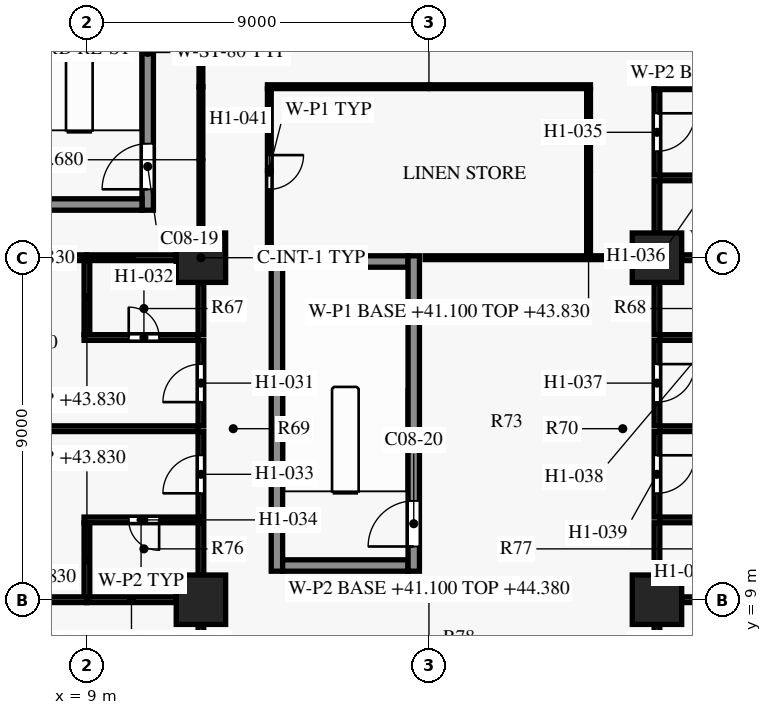
"""IFC4 building model, lengths in metres.
Left out: names, types, materials, properties, quantities, classifications, styles, units other than length and angle.
Written with IfcOpenShell. Run it as: python <this file> out.ifc"""

import sys

from ifc_helpers import new_model, si_unit, direction, frame, frame_2d, origin, origin_2d, place, context, subcontext, project, spatial, rectangle, extrude, element, fill, save


model = new_model("IFC4")
c1 = context("Model", 3, precision=1e-05, world=origin(), true_north=direction((0.0, 1.0)))
c2 = subcontext(c1, "Body", "Model", "MODEL_VIEW")
j1 = project(units=[si_unit("LENGTHUNIT", "METRE"), si_unit("PLANEANGLEUNIT", "RADIAN")], contexts=[c1])
p1 = place(None, origin())
s1 = spatial("IfcSite", under=j1, at=p1, CompositionType="ELEMENT")
p2 = place(p1, origin())
s2 = spatial("IfcBuilding", under=s1, at=p2, CompositionType="ELEMENT")
p3 = place(p2, frame((0.0, 0.0, 41.1)))
s3 = spatial("IfcBuildingStorey", under=s2, at=p3, CompositionType="ELEMENT", Elevation=41.1)
for number, where, z_axis, x_axis in (
    (1, (12.0, 9.0, 0.0), (0.0, 0.0, 1.0), (1.0, 0.0, 0.0)),
    (2, (12.0, 18.0, 0.0), (0.0, 0.0, 1.0), (1.0, 0.0, 0.0)),
    (3, (24.0, 9.0, 0.0), (0.0, 0.0, 1.0), (1.0, 0.0, 0.0)),
    (4, (24.0, 18.0, 0.0), (0.0, 0.0, 1.0), (1.0, 0.0, 0.0)),
):
    element("IfcColumn", number, at=place(p3, frame(where, z_axis=z_axis, x_axis=x_axis)), inside=s3, PredefinedType="COLUMN", context=c2, shape_type="SweptSolid", body=[
        extrude(rectangle(XDim=1.3, YDim=1.3, at=origin_2d()), origin(), (0.0, 0.0, 1.0), 3.6),
    ])
for number, where, z_axis, x_axis in (
    (5, (14.15, 9.9, 0.0), (0.0, 0.0, 1.0), (1.0, 0.0, 0.0)),
    (6, (14.15, 17.9, 0.0), (0.0, 0.0, 1.0), (1.0, 0.0, 0.0)),
    (7, (7.15, 19.4, 0.0), (0.0, 0.0, 1.0), (1.0, 0.0, 0.0)),
):
    element("IfcWall", number, at=place(p3, frame(where, z_axis=z_axis, x_axis=x_axis)), inside=s3, PredefinedType="SHEAR", context=c2, shape_type="SweptSolid", body=[
        extrude(rectangle(XDim=3.3, YDim=0.3, at=frame_2d((1.65, 0.0))), origin(), (0.0, 0.0, 1.0), 3.3),
    ])
p4 = place(p3, frame((10.6, 19.25, 0.0), z_axis=(0.0, 0.0, 1.0), x_axis=(0.0, 1.0, 0.0)))
e8 = element("IfcWall", 8, at=p4, inside=s3, PredefinedType="SHEAR", context=c2, shape_type="SweptSolid", body=[
    extrude(rectangle(XDim=8.3, YDim=0.3, at=frame_2d((4.15, 0.0))), origin(), (0.0, 0.0, 1.0), 3.3),
])
p5 = place(p4, frame((0.55, 0.0, 0.0)))
e9 = element("IfcOpeningElement", 9, at=p5, cuts=e8, PredefinedType="OPENING", context=c2, shape_type="SweptSolid", body=[
    extrude(rectangle(XDim=1.2, YDim=2.2, at=frame_2d((0.6, 1.1))), frame((0.0, 0.16, 0.0), z_axis=(0.0, -1.0, 0.0), x_axis=(1.0, 0.0, 0.0)), (0.0, 0.0, 1.0), 0.32),
])
p6 = place(p3, frame((14.0, 9.75, 0.0), z_axis=(0.0, 0.0, 1.0), x_axis=(0.0, 1.0, 0.0)))
e10 = element("IfcWall", 10, at=p6, inside=s3, PredefinedType="SHEAR", context=c2, shape_type="SweptSolid", body=[
    extrude(rectangle(XDim=8.3, YDim=0.3, at=frame_2d((4.15, 0.0))), origin(), (0.0, 0.0, 1.0), 3.3),
])
p7 = place(p3, frame((17.6, 9.75, 0.0), z_axis=(0.0, 0.0, 1.0), x_axis=(0.0, 1.0, 0.0)))
e11 = element("IfcWall", 11, at=p7, inside=s3, PredefinedType="SHEAR", context=c2, shape_type="SweptSolid", body=[
    extrude(rectangle(XDim=8.3, YDim=0.3, at=frame_2d((4.15, 0.0))), origin(), (0.0, 0.0, 1.0), 3.3),
])
p8 = place(p7, frame((0.65, 0.0, 0.0)))
e12 = element("IfcOpeningElement", 12, at=p8, cuts=e11, PredefinedType="OPENING", context=c2, shape_type="SweptSolid", body=[
    extrude(rectangle(XDim=1.2, YDim=2.2, at=frame_2d((0.6, 1.1))), frame((0.0, 0.16, 0.0), z_axis=(0.0, -1.0, 0.0), x_axis=(1.0, 0.0, 0.0)), (0.0, 0.0, 1.0), 0.32),
])
for number, where, z_axis, x_axis in (
    (13, (12.0, 7.275, 0.0), (0.0, 0.0, 1.0), (0.0, 1.0, 0.0)),
    (14, (24.0, 8.345, 0.0), (0.0, 0.0, 1.0), (0.0, -1.0, 0.0)),
):
    element("IfcWall", number, at=place(p3, frame(where, z_axis=z_axis, x_axis=x_axis)), inside=s3, PredefinedType="PARTITIONING", context=c2, shape_type="SweptSolid", body=[
        extrude(rectangle(XDim=1.07, YDim=0.15, at=frame_2d((0.535, 0.0))), origin(), (0.0, 0.0, 1.0), 2.58),
    ])
p9 = place(p3, frame((9.0, 9.0, 0.0), z_axis=(0.0, 0.0, 1.0), x_axis=(-1.0, 0.0, 0.0)))
e15 = element("IfcWall", 15, at=p9, inside=s3, PredefinedType="PARTITIONING", context=c2, shape_type="SweptSolid", body=[
    extrude(rectangle(XDim=7.975, YDim=0.15, at=frame_2d((3.988, 0.0))), origin(), (0.0, 0.0, 1.0), 2.73),
])
for number, where, z_axis, x_axis in (
    (16, (11.345, 9.0, 0.0), (0.0, 0.0, 1.0), (-1.0, 0.0, 0.0)),
    (17, (27.0, 9.0, 0.0), (0.0, 0.0, 1.0), (-1.0, 0.0, 0.0)),
):
    element("IfcWall", number, at=place(p3, frame(where, z_axis=z_axis, x_axis=x_axis)), inside=s3, PredefinedType="PARTITIONING", context=c2, shape_type="SweptSolid", body=[
        extrude(rectangle(XDim=2.345, YDim=0.15, at=frame_2d((1.172, 0.0))), origin(), (0.0, 0.0, 1.0), 2.73),
    ])
p10 = place(p3, frame((12.0, 9.655, 0.0), z_axis=(0.0, 0.0, 1.0), x_axis=(0.0, 1.0, 0.0)))
e18 = element("IfcWall", 18, at=p10, inside=s3, PredefinedType="PARTITIONING", context=c2, shape_type="SweptSolid", body=[
    extrude(rectangle(XDim=1.37, YDim=0.15, at=frame_2d((0.685, 0.0))), origin(), (0.0, 0.0, 1.0), 2.58),
])
p11 = place(p3, frame((9.0, 11.025, 0.0), z_axis=(0.0, 0.0, 1.0), x_axis=(0.0, -1.0, 0.0)))
e19 = element("IfcWall", 19, at=p11, inside=s3, PredefinedType="PARTITIONING", context=c2, shape_type="SweptSolid", body=[
    extrude(rectangle(XDim=1.95, YDim=0.15, at=frame_2d((0.975, 0.0))), origin(), (0.0, 0.0, 1.0), 2.73),
])
p12 = place(p3, frame((24.0, 11.025, 0.0), z_axis=(0.0, 0.0, 1.0), x_axis=(0.0, -1.0, 0.0)))
e20 = element("IfcWall", 20, at=p12, inside=s3, PredefinedType="PARTITIONING", context=c2, shape_type="SweptSolid", body=[
    extrude(rectangle(XDim=1.37, YDim=0.15, at=frame_2d((0.685, 0.0))), origin(), (0.0, 0.0, 1.0), 2.58),
])
p13 = place(p3, frame((11.925, 11.1, 0.0), z_axis=(0.0, 0.0, 1.0), x_axis=(-1.0, 0.0, 0.0)))
e21 = element("IfcWall", 21, at=p13, inside=s3, PredefinedType="PARTITIONING", context=c2, shape_type="SweptSolid", body=[
    extrude(rectangle(XDim=3.0, YDim=0.15, at=frame_2d((1.5, 0.0))), origin(), (0.0, 0.0, 1.0), 2.58),
])
p14 = place(p13, frame((1.025, 0.0, 0.0)))
e22 = element("IfcOpeningElement", 22, at=p14, cuts=e21, PredefinedType="OPENING", context=c2, shape_type="SweptSolid", body=[
    extrude(rectangle(XDim=0.8, YDim=2.1, at=frame_2d((0.4, 1.05))), frame((0.0, 0.085, 0.0), z_axis=(0.0, -1.0, 0.0), x_axis=(1.0, 0.0, 0.0)), (0.0, 0.0, 1.0), 0.17),
])
p15 = place(p3, frame((27.075, 11.1, 0.0), z_axis=(0.0, 0.0, 1.0), x_axis=(-1.0, 0.0, 0.0)))
e23 = element("IfcWall", 23, at=p15, inside=s3, PredefinedType="PARTITIONING", context=c2, shape_type="SweptSolid", body=[
    extrude(rectangle(XDim=3.0, YDim=0.15, at=frame_2d((1.5, 0.0))), origin(), (0.0, 0.0, 1.0), 2.58),
])
p16 = place(p15, frame((1.175, 0.0, 0.0)))
e24 = element("IfcOpeningElement", 24, at=p16, cuts=e23, PredefinedType="OPENING", context=c2, shape_type="SweptSolid", body=[
    extrude(rectangle(XDim=0.8, YDim=2.1, at=frame_2d((0.4, 1.05))), frame((0.0, 0.085, 0.0), z_axis=(0.0, -1.0, 0.0), x_axis=(1.0, 0.0, 0.0)), (0.0, 0.0, 1.0), 0.17),
])
p17 = place(p3, frame((12.0, 11.175, 0.0), z_axis=(0.0, 0.0, 1.0), x_axis=(0.0, 1.0, 0.0)))
e25 = element("IfcWall", 25, at=p17, inside=s3, PredefinedType="PARTITIONING", context=c2, shape_type="SweptSolid", body=[
    extrude(rectangle(XDim=2.25, YDim=0.15, at=frame_2d((1.125, 0.0))), origin(), (0.0, 0.0, 1.0), 2.58),
])
p18 = place(p17, frame((0.625, 0.0, 0.0)))
e26 = element("IfcOpeningElement", 26, at=p18, cuts=e25, PredefinedType="OPENING", context=c2, shape_type="SweptSolid", body=[
    extrude(rectangle(XDim=1.0, YDim=2.1, at=frame_2d((0.5, 1.05))), frame((0.0, 0.085, 0.0), z_axis=(0.0, -1.0, 0.0), x_axis=(1.0, 0.0, 0.0)), (0.0, 0.0, 1.0), 0.17),
])
p19 = place(p3, frame((24.0, 13.425, 0.0), z_axis=(0.0, 0.0, 1.0), x_axis=(0.0, -1.0, 0.0)))
e27 = element("IfcWall", 27, at=p19, inside=s3, PredefinedType="PARTITIONING", context=c2, shape_type="SweptSolid", body=[
    extrude(rectangle(XDim=2.25, YDim=0.15, at=frame_2d((1.125, 0.0))), origin(), (0.0, 0.0, 1.0), 2.58),
])
p20 = place(p19, frame((0.625, 0.0, 0.0)))
e28 = element("IfcOpeningElement", 28, at=p20, cuts=e27, PredefinedType="OPENING", context=c2, shape_type="SweptSolid", body=[
    extrude(rectangle(XDim=1.0, YDim=2.1, at=frame_2d((0.5, 1.05))), frame((0.0, 0.085, 0.0), z_axis=(0.0, -1.0, 0.0), x_axis=(1.0, 0.0, 0.0)), (0.0, 0.0, 1.0), 0.17),
])
for number, where, z_axis, x_axis in (
    (29, (11.925, 13.5, 0.0), (0.0, 0.0, 1.0), (-1.0, 0.0, 0.0)),
    (30, (35.425, 13.5, 0.0), (0.0, 0.0, 1.0), (-1.0, 0.0, 0.0)),
):
    element("IfcWall", number, at=place(p3, frame(where, z_axis=z_axis, x_axis=x_axis)), inside=s3, PredefinedType="PARTITIONING", context=c2, shape_type="SweptSolid", body=[
        extrude(rectangle(XDim=11.35, YDim=0.15, at=frame_2d((5.675, 0.0))), origin(), (0.0, 0.0, 1.0), 2.58),
    ])
p21 = place(p3, frame((12.0, 13.575, 0.0), z_axis=(0.0, 0.0, 1.0), x_axis=(0.0, 1.0, 0.0)))
e31 = element("IfcWall", 31, at=p21, inside=s3, PredefinedType="PARTITIONING", context=c2, shape_type="SweptSolid", body=[
    extrude(rectangle(XDim=2.25, YDim=0.15, at=frame_2d((1.125, 0.0))), origin(), (0.0, 0.0, 1.0), 2.58),
])
p22 = place(p21, frame((0.625, 0.0, 0.0)))
e32 = element("IfcOpeningElement", 32, at=p22, cuts=e31, PredefinedType="OPENING", context=c2, shape_type="SweptSolid", body=[
    extrude(rectangle(XDim=1.0, YDim=2.1, at=frame_2d((0.5, 1.05))), frame((0.0, 0.085, 0.0), z_axis=(0.0, -1.0, 0.0), x_axis=(1.0, 0.0, 0.0)), (0.0, 0.0, 1.0), 0.17),
])
p23 = place(p3, frame((24.0, 15.825, 0.0), z_axis=(0.0, 0.0, 1.0), x_axis=(0.0, -1.0, 0.0)))
e33 = element("IfcWall", 33, at=p23, inside=s3, PredefinedType="PARTITIONING", context=c2, shape_type="SweptSolid", body=[
    extrude(rectangle(XDim=2.25, YDim=0.15, at=frame_2d((1.125, 0.0))), origin(), (0.0, 0.0, 1.0), 2.58),
])
p24 = place(p23, frame((0.625, 0.0, 0.0)))
e34 = element("IfcOpeningElement", 34, at=p24, cuts=e33, PredefinedType="OPENING", context=c2, shape_type="SweptSolid", body=[
    extrude(rectangle(XDim=1.0, YDim=2.1, at=frame_2d((0.5, 1.05))), frame((0.0, 0.085, 0.0), z_axis=(0.0, -1.0, 0.0), x_axis=(1.0, 0.0, 0.0)), (0.0, 0.0, 1.0), 0.17),
])
p25 = place(p3, frame((8.925, 15.9, 0.0), z_axis=(0.0, 0.0, 1.0), x_axis=(1.0, 0.0, 0.0)))
e35 = element("IfcWall", 35, at=p25, inside=s3, PredefinedType="PARTITIONING", context=c2, shape_type="SweptSolid", body=[
    extrude(rectangle(XDim=3.0, YDim=0.15, at=frame_2d((1.5, 0.0))), origin(), (0.0, 0.0, 1.0), 2.58),
])
p26 = place(p25, frame((1.175, 0.0, 0.0)))
e36 = element("IfcOpeningElement", 36, at=p26, cuts=e35, PredefinedType="OPENING", context=c2, shape_type="SweptSolid", body=[
    extrude(rectangle(XDim=0.8, YDim=2.1, at=frame_2d((0.4, 1.05))), frame((0.0, 0.085, 0.0), z_axis=(0.0, -1.0, 0.0), x_axis=(1.0, 0.0, 0.0)), (0.0, 0.0, 1.0), 0.17),
])
p27 = place(p3, frame((24.075, 15.9, 0.0), z_axis=(0.0, 0.0, 1.0), x_axis=(1.0, 0.0, 0.0)))
e37 = element("IfcWall", 37, at=p27, inside=s3, PredefinedType="PARTITIONING", context=c2, shape_type="SweptSolid", body=[
    extrude(rectangle(XDim=3.0, YDim=0.15, at=frame_2d((1.5, 0.0))), origin(), (0.0, 0.0, 1.0), 2.58),
])
p28 = place(p27, frame((1.025, 0.0, 0.0)))
e38 = element("IfcOpeningElement", 38, at=p28, cuts=e37, PredefinedType="OPENING", context=c2, shape_type="SweptSolid", body=[
    extrude(rectangle(XDim=0.8, YDim=2.1, at=frame_2d((0.4, 1.05))), frame((0.0, 0.085, 0.0), z_axis=(0.0, -1.0, 0.0), x_axis=(1.0, 0.0, 0.0)), (0.0, 0.0, 1.0), 0.17),
])
for number, where, z_axis, x_axis in (
    (39, (12.0, 15.975, 0.0), (0.0, 0.0, 1.0), (0.0, 1.0, 0.0)),
    (40, (24.0, 17.345, 0.0), (0.0, 0.0, 1.0), (0.0, -1.0, 0.0)),
):
    element("IfcWall", number, at=place(p3, frame(where, z_axis=z_axis, x_axis=x_axis)), inside=s3, PredefinedType="PARTITIONING", context=c2, shape_type="SweptSolid", body=[
        extrude(rectangle(XDim=1.37, YDim=0.15, at=frame_2d((0.685, 0.0))), origin(), (0.0, 0.0, 1.0), 2.58),
    ])
p29 = place(p3, frame((9.0, 17.925, 0.0), z_axis=(0.0, 0.0, 1.0), x_axis=(0.0, -1.0, 0.0)))
e41 = element("IfcWall", 41, at=p29, inside=s3, PredefinedType="PARTITIONING", context=c2, shape_type="SweptSolid", body=[
    extrude(rectangle(XDim=1.95, YDim=0.15, at=frame_2d((0.975, 0.0))), origin(), (0.0, 0.0, 1.0), 2.73),
])
p30 = place(p3, frame((9.0, 18.0, 0.0), z_axis=(0.0, 0.0, 1.0), x_axis=(-1.0, 0.0, 0.0)))
e42 = element("IfcWall", 42, at=p30, inside=s3, PredefinedType="PARTITIONING", context=c2, shape_type="SweptSolid", body=[
    extrude(rectangle(XDim=8.875, YDim=0.15, at=frame_2d((4.438, 0.0))), origin(), (0.0, 0.0, 1.0), 2.73),
])
p31 = place(p3, frame((11.345, 18.0, 0.0), z_axis=(0.0, 0.0, 1.0), x_axis=(-1.0, 0.0, 0.0)))
e43 = element("IfcWall", 43, at=p31, inside=s3, PredefinedType="PARTITIONING", context=c2, shape_type="SweptSolid", body=[
    extrude(rectangle(XDim=2.345, YDim=0.15, at=frame_2d((1.172, 0.0))), origin(), (0.0, 0.0, 1.0), 2.73),
])
p32 = place(p3, frame((23.33, 18.0, 0.0), z_axis=(0.0, 0.0, 1.0), x_axis=(-1.0, 0.0, 0.0)))
e44 = element("IfcWall", 44, at=p32, inside=s3, PredefinedType="PARTITIONING", context=c2, shape_type="SweptSolid", body=[
    extrude(rectangle(XDim=5.43, YDim=0.1, at=frame_2d((2.715, 0.0))), origin(), (0.0, 0.0, 1.0), 2.73),
])
p33 = place(p3, frame((27.0, 18.0, 0.0), z_axis=(0.0, 0.0, 1.0), x_axis=(-1.0, 0.0, 0.0)))
e45 = element("IfcWall", 45, at=p33, inside=s3, PredefinedType="PARTITIONING", context=c2, shape_type="SweptSolid", body=[
    extrude(rectangle(XDim=2.345, YDim=0.15, at=frame_2d((1.172, 0.0))), origin(), (0.0, 0.0, 1.0), 2.73),
])
p34 = place(p3, frame((22.2, 18.05, 0.0), z_axis=(0.0, 0.0, 1.0), x_axis=(0.0, 1.0, 0.0)))
e46 = element("IfcWall", 46, at=p34, inside=s3, PredefinedType="PARTITIONING", context=c2, shape_type="SweptSolid", body=[
    extrude(rectangle(XDim=4.4, YDim=0.1, at=frame_2d((2.2, 0.0))), origin(), (0.0, 0.0, 1.0), 2.73),
])
p35 = place(p3, frame((24.0, 20.025, 0.0), z_axis=(0.0, 0.0, 1.0), x_axis=(0.0, -1.0, 0.0)))
e47 = element("IfcWall", 47, at=p35, inside=s3, PredefinedType="PARTITIONING", context=c2, shape_type="SweptSolid", body=[
    extrude(rectangle(XDim=1.37, YDim=0.15, at=frame_2d((0.685, 0.0))), origin(), (0.0, 0.0, 1.0), 2.58),
])
p36 = place(p3, frame((27.075, 20.1, 0.0), z_axis=(0.0, 0.0, 1.0), x_axis=(-1.0, 0.0, 0.0)))
e48 = element("IfcWall", 48, at=p36, inside=s3, PredefinedType="PARTITIONING", context=c2, shape_type="SweptSolid", body=[
    extrude(rectangle(XDim=3.0, YDim=0.15, at=frame_2d((1.5, 0.0))), origin(), (0.0, 0.0, 1.0), 2.58),
])
p37 = place(p36, frame((1.175, 0.0, 0.0)))
e49 = element("IfcOpeningElement", 49, at=p37, cuts=e48, PredefinedType="OPENING", context=c2, shape_type="SweptSolid", body=[
    extrude(rectangle(XDim=0.8, YDim=2.1, at=frame_2d((0.4, 1.05))), frame((0.0, 0.085, 0.0), z_axis=(0.0, -1.0, 0.0), x_axis=(1.0, 0.0, 0.0)), (0.0, 0.0, 1.0), 0.17),
])
p38 = place(p3, frame((24.0, 22.425, 0.0), z_axis=(0.0, 0.0, 1.0), x_axis=(0.0, -1.0, 0.0)))
e50 = element("IfcWall", 50, at=p38, inside=s3, PredefinedType="PARTITIONING", context=c2, shape_type="SweptSolid", body=[
    extrude(rectangle(XDim=2.25, YDim=0.15, at=frame_2d((1.125, 0.0))), origin(), (0.0, 0.0, 1.0), 2.58),
])
p39 = place(p38, frame((0.625, 0.0, 0.0)))
e51 = element("IfcOpeningElement", 51, at=p39, cuts=e50, PredefinedType="OPENING", context=c2, shape_type="SweptSolid", body=[
    extrude(rectangle(XDim=1.0, YDim=2.1, at=frame_2d((0.5, 1.05))), frame((0.0, 0.085, 0.0), z_axis=(0.0, -1.0, 0.0), x_axis=(1.0, 0.0, 0.0)), (0.0, 0.0, 1.0), 0.17),
])
p40 = place(p3, frame((13.8, 22.45, 0.0), z_axis=(0.0, 0.0, 1.0), x_axis=(0.0, -1.0, 0.0)))
e52 = element("IfcWall", 52, at=p40, inside=s3, PredefinedType="PARTITIONING", context=c2, shape_type="SweptSolid", body=[
    extrude(rectangle(XDim=4.25, YDim=0.1, at=frame_2d((2.125, 0.0))), origin(), (0.0, 0.0, 1.0), 3.28),
])
p41 = place(p40, frame((1.75, 0.0, 0.0)))
e53 = element("IfcOpeningElement", 53, at=p41, cuts=e52, PredefinedType="OPENING", context=c2, shape_type="SweptSolid", body=[
    extrude(rectangle(XDim=0.9, YDim=2.1, at=frame_2d((0.45, 1.05))), frame((0.0, 0.06, 0.0), z_axis=(0.0, -1.0, 0.0), x_axis=(1.0, 0.0, 0.0)), (0.0, 0.0, 1.0), 0.12),
])
p42 = place(p3, frame((12.0, 22.5, 0.0), z_axis=(0.0, 0.0, 1.0), x_axis=(0.0, -1.0, 0.0)))
e54 = element("IfcWall", 54, at=p42, inside=s3, PredefinedType="PARTITIONING", context=c2, shape_type="SweptSolid", body=[
    extrude(rectangle(XDim=3.845, YDim=0.1, at=frame_2d((1.922, 0.0))), origin(), (0.0, 0.0, 1.0), 2.58),
])
p43 = place(p3, frame((12.0, 26.345, 0.0), z_axis=(0.0, 0.0, 1.0), x_axis=(0.0, -1.0, 0.0)))
e55 = element("IfcWall", 55, at=p43, inside=s3, PredefinedType="PARTITIONING", context=c2, shape_type="SweptSolid", body=[
    extrude(rectangle(XDim=3.845, YDim=0.1, at=frame_2d((1.922, 0.0))), origin(), (0.0, 0.0, 1.0), 2.58),
])
p44 = place(p43, frame((1.145, 0.0, 0.0)))
e56 = element("IfcOpeningElement", 56, at=p44, cuts=e55, PredefinedType="OPENING", context=c2, shape_type="SweptSolid", body=[
    extrude(rectangle(XDim=0.9, YDim=2.1, at=frame_2d((0.45, 1.05))), frame((0.0, 0.06, 0.0), z_axis=(0.0, -1.0, 0.0), x_axis=(1.0, 0.0, 0.0)), (0.0, 0.0, 1.0), 0.12),
])
p45 = place(p3, frame((22.25, 22.5, 0.0), z_axis=(0.0, 0.0, 1.0), x_axis=(-1.0, 0.0, 0.0)))
e57 = element("IfcWall", 57, at=p45, inside=s3, PredefinedType="PARTITIONING", context=c2, shape_type="SweptSolid", body=[
    extrude(rectangle(XDim=8.5, YDim=0.1, at=frame_2d((4.25, 0.0))), origin(), (0.0, 0.0, 1.0), 2.58),
])
p46 = place(p3, frame((35.425, 22.5, 0.0), z_axis=(0.0, 0.0, 1.0), x_axis=(-1.0, 0.0, 0.0)))
e58 = element("IfcWall", 58, at=p46, inside=s3, PredefinedType="PARTITIONING", context=c2, shape_type="SweptSolid", body=[
    extrude(rectangle(XDim=11.5, YDim=0.15, at=frame_2d((5.75, 0.0))), origin(), (0.0, 0.0, 1.0), 2.58),
])
p47 = place(p5, origin())
e59 = element("IfcDoor", 59, at=p47, inside=s3, OperationType="SINGLE_SWING_RIGHT", PredefinedType="DOOR", context=c2, shape_type="SweptSolid", body=[
    extrude(rectangle(XDim=1.2, YDim=2.2, at=frame_2d((0.6, 1.1))), frame((0.0, 0.025, 0.0), z_axis=(0.0, -1.0, 0.0), x_axis=(1.0, 0.0, 0.0)), (0.0, 0.0, 1.0), 0.05),
])
fill(e9, e59)
p48 = place(p8, origin())
e60 = element("IfcDoor", 60, at=p48, inside=s3, OperationType="SINGLE_SWING_LEFT", PredefinedType="DOOR", context=c2, shape_type="SweptSolid", body=[
    extrude(rectangle(XDim=1.2, YDim=2.2, at=frame_2d((0.6, 1.1))), frame((0.0, 0.025, 0.0), z_axis=(0.0, -1.0, 0.0), x_axis=(1.0, 0.0, 0.0)), (0.0, 0.0, 1.0), 0.05),
])
fill(e12, e60)
p49 = place(p22, origin())
e61 = element("IfcDoor", 61, at=p49, inside=s3, OperationType="SINGLE_SWING_LEFT", PredefinedType="DOOR", context=c2, shape_type="SweptSolid", body=[
    extrude(rectangle(XDim=1.0, YDim=2.1, at=frame_2d((0.5, 1.05))), frame((0.0, 0.025, 0.0), z_axis=(0.0, -1.0, 0.0), x_axis=(1.0, 0.0, 0.0)), (0.0, 0.0, 1.0), 0.05),
])
fill(e32, e61)
p50 = place(p26, origin())
e62 = element("IfcDoor", 62, at=p50, inside=s3, OperationType="SINGLE_SWING_LEFT", PredefinedType="DOOR", context=c2, shape_type="SweptSolid", body=[
    extrude(rectangle(XDim=0.8, YDim=2.1, at=frame_2d((0.4, 1.05))), frame((0.0, 0.025, 0.0), z_axis=(0.0, -1.0, 0.0), x_axis=(1.0, 0.0, 0.0)), (0.0, 0.0, 1.0), 0.05),
])
fill(e36, e62)
p51 = place(p18, origin())
e63 = element("IfcDoor", 63, at=p51, inside=s3, OperationType="SINGLE_SWING_LEFT", PredefinedType="DOOR", context=c2, shape_type="SweptSolid", body=[
    extrude(rectangle(XDim=1.0, YDim=2.1, at=frame_2d((0.5, 1.05))), frame((0.0, 0.025, 0.0), z_axis=(0.0, -1.0, 0.0), x_axis=(1.0, 0.0, 0.0)), (0.0, 0.0, 1.0), 0.05),
])
fill(e26, e63)
p52 = place(p14, origin())
e64 = element("IfcDoor", 64, at=p52, inside=s3, OperationType="SINGLE_SWING_LEFT", PredefinedType="DOOR", context=c2, shape_type="SweptSolid", body=[
    extrude(rectangle(XDim=0.8, YDim=2.1, at=frame_2d((0.4, 1.05))), frame((0.0, 0.025, 0.0), z_axis=(0.0, -1.0, 0.0), x_axis=(1.0, 0.0, 0.0)), (0.0, 0.0, 1.0), 0.05),
])
fill(e22, e64)
p53 = place(p39, origin())
e65 = element("IfcDoor", 65, at=p53, inside=s3, OperationType="SINGLE_SWING_LEFT", PredefinedType="DOOR", context=c2, shape_type="SweptSolid", body=[
    extrude(rectangle(XDim=1.0, YDim=2.1, at=frame_2d((0.5, 1.05))), frame((0.0, 0.025, 0.0), z_axis=(0.0, -1.0, 0.0), x_axis=(1.0, 0.0, 0.0)), (0.0, 0.0, 1.0), 0.05),
])
fill(e51, e65)
p54 = place(p24, origin())
e66 = element("IfcDoor", 66, at=p54, inside=s3, OperationType="SINGLE_SWING_LEFT", PredefinedType="DOOR", context=c2, shape_type="SweptSolid", body=[
    extrude(rectangle(XDim=1.0, YDim=2.1, at=frame_2d((0.5, 1.05))), frame((0.0, 0.025, 0.0), z_axis=(0.0, -1.0, 0.0), x_axis=(1.0, 0.0, 0.0)), (0.0, 0.0, 1.0), 0.05),
])
fill(e34, e66)
p55 = place(p20, origin())
e67 = element("IfcDoor", 67, at=p55, inside=s3, OperationType="SINGLE_SWING_LEFT", PredefinedType="DOOR", context=c2, shape_type="SweptSolid", body=[
    extrude(rectangle(XDim=1.0, YDim=2.1, at=frame_2d((0.5, 1.05))), frame((0.0, 0.025, 0.0), z_axis=(0.0, -1.0, 0.0), x_axis=(1.0, 0.0, 0.0)), (0.0, 0.0, 1.0), 0.05),
])
fill(e28, e67)
p56 = place(p41, origin())
e68 = element("IfcDoor", 68, at=p56, inside=s3, OperationType="SINGLE_SWING_LEFT", PredefinedType="DOOR", context=c2, shape_type="SweptSolid", body=[
    extrude(rectangle(XDim=0.9, YDim=2.1, at=frame_2d((0.45, 1.05))), frame((0.0, 0.025, 0.0), z_axis=(0.0, -1.0, 0.0), x_axis=(1.0, 0.0, 0.0)), (0.0, 0.0, 1.0), 0.05),
])
fill(e53, e68)
save(model, sys.argv[1])
